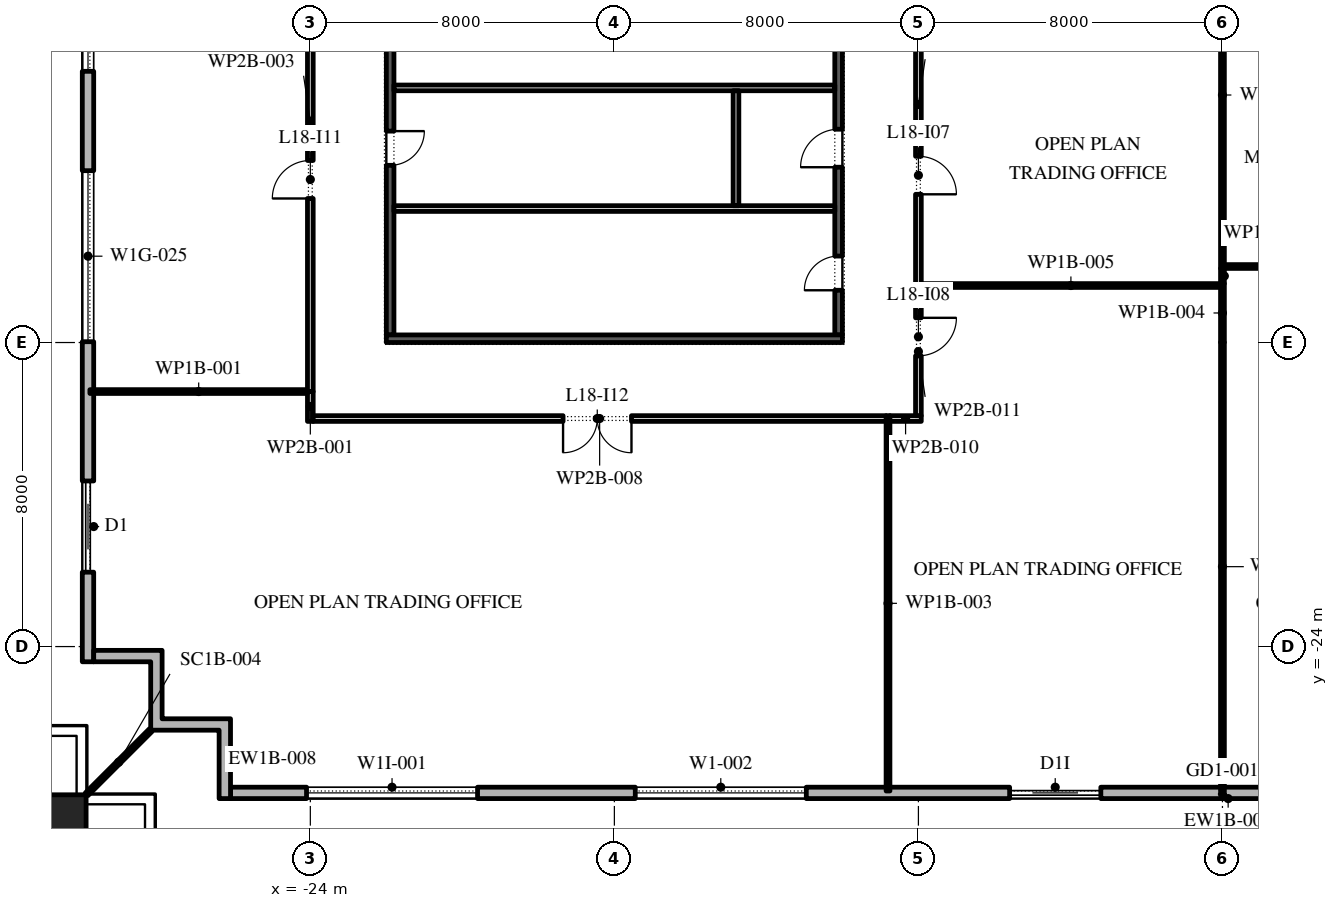
"""IFC4 building model, lengths in metres.
Left out: names, types, materials, properties, quantities, classifications, styles, units other than length and angle.
Written with IfcOpenShell. Run it as: python <this file> out.ifc"""

import sys

from ifc_helpers import new_model, si_unit, direction, frame, frame_2d, origin, origin_2d, place, context, subcontext, project, spatial, polyline, rectangle, outline, extrude, element, fill, save


model = new_model("IFC4")
c1 = context("Model", 3, precision=1e-05, world=origin(), true_north=direction((0.0, 1.0)))
c2 = subcontext(c1, "Body", "Model", "MODEL_VIEW")
j1 = project(units=[si_unit("LENGTHUNIT", "METRE"), si_unit("PLANEANGLEUNIT", "RADIAN")], contexts=[c1])
p1 = place(None, origin())
s1 = spatial("IfcSite", under=j1, at=p1, CompositionType="ELEMENT")
p2 = place(p1, origin())
s2 = spatial("IfcBuilding", under=s1, at=p2, CompositionType="ELEMENT")
p3 = place(p2, frame((0.0, 0.0, 85.8)))
s3 = spatial("IfcBuildingStorey", under=s2, at=p3, CompositionType="ELEMENT", Elevation=85.8)
p4 = place(p3, frame((-30.6, -28.6, 0.0), z_axis=(0.0, 0.0, 1.0), x_axis=(1.0, 0.0, 0.0)))
e1 = element("IfcColumn", 1, at=p4, inside=s3, PredefinedType="COLUMN", context=c2, shape_type="SweptSolid", body=[
    extrude(rectangle(XDim=1.4, YDim=1.4, at=origin_2d()), origin(), (0.0, 0.0, 1.0), 4.2),
])
p5 = place(p3, frame((-26.1, -27.85, 0.0), z_axis=(0.0, 0.0, 1.0), x_axis=(1.0, 0.0, 0.0)))
e2 = element("IfcWall", 2, at=p5, inside=s3, PredefinedType="STANDARD", context=c2, shape_type="SweptSolid", body=[
    extrude(rectangle(XDim=52.5, YDim=0.3, at=frame_2d((26.25, 0.0))), origin(), (0.0, 0.0, 1.0), 3.95),
])
p6 = place(p5, frame((2.0, 0.0, 0.45)))
e3 = element("IfcOpeningElement", 3, at=p6, cuts=e2, PredefinedType="OPENING", context=c2, shape_type="SweptSolid", body=[
    extrude(rectangle(XDim=4.5, YDim=2.7, at=frame_2d((2.25, 1.35))), frame((0.0, 0.16, 0.0), z_axis=(0.0, -1.0, 0.0), x_axis=(1.0, 0.0, 0.0)), (0.0, 0.0, 1.0), 0.32),
])
p7 = place(p5, frame((10.65, 0.0, 0.45)))
e4 = element("IfcOpeningElement", 4, at=p7, cuts=e2, PredefinedType="OPENING", context=c2, shape_type="SweptSolid", body=[
    extrude(rectangle(XDim=4.5, YDim=3.05, at=frame_2d((2.25, 1.525))), frame((0.0, 0.16, 0.0), z_axis=(0.0, -1.0, 0.0), x_axis=(1.0, 0.0, 0.0)), (0.0, 0.0, 1.0), 0.32),
])
p8 = place(p5, frame((20.5, 0.0, 0.0)))
e5 = element("IfcOpeningElement", 5, at=p8, cuts=e2, PredefinedType="OPENING", context=c2, shape_type="SweptSolid", body=[
    extrude(rectangle(XDim=2.4, YDim=3.15, at=frame_2d((1.2, 1.575))), frame((0.0, 0.16, 0.0), z_axis=(0.0, -1.0, 0.0), x_axis=(1.0, 0.0, 0.0)), (0.0, 0.0, 1.0), 0.32),
])
p9 = place(p5, frame((28.25, 0.0, 0.45)))
e6 = element("IfcOpeningElement", 6, at=p9, cuts=e2, PredefinedType="OPENING", context=c2, shape_type="SweptSolid", body=[
    extrude(rectangle(XDim=4.5, YDim=2.7, at=frame_2d((2.25, 1.35))), frame((0.0, 0.16, 0.0), z_axis=(0.0, -1.0, 0.0), x_axis=(1.0, 0.0, 0.0)), (0.0, 0.0, 1.0), 0.32),
])
p10 = place(p5, frame((37.05, 0.0, 0.45)))
e7 = element("IfcOpeningElement", 7, at=p10, cuts=e2, PredefinedType="OPENING", context=c2, shape_type="SweptSolid", body=[
    extrude(rectangle(XDim=4.5, YDim=3.05, at=frame_2d((2.25, 1.525))), frame((0.0, 0.16, 0.0), z_axis=(0.0, -1.0, 0.0), x_axis=(1.0, 0.0, 0.0)), (0.0, 0.0, 1.0), 0.32),
])
p11 = place(p5, frame((45.85, 0.0, 0.45)))
e8 = element("IfcOpeningElement", 8, at=p11, cuts=e2, PredefinedType="OPENING", context=c2, shape_type="SweptSolid", body=[
    extrude(rectangle(XDim=4.5, YDim=2.7, at=frame_2d((2.25, 1.35))), frame((0.0, 0.16, 0.0), z_axis=(0.0, -1.0, 0.0), x_axis=(1.0, 0.0, 0.0)), (0.0, 0.0, 1.0), 0.32),
])
p12 = place(p3, frame((-29.85, 25.1, 0.0), z_axis=(0.0, 0.0, 1.0), x_axis=(0.0, -1.0, 0.0)))
e9 = element("IfcWall", 9, at=p12, inside=s3, PredefinedType="STANDARD", context=c2, shape_type="SweptSolid", body=[
    extrude(rectangle(XDim=49.5, YDim=0.3, at=frame_2d((24.75, 0.0))), origin(), (0.0, 0.0, 1.0), 3.95),
])
p13 = place(p12, frame((1.157, 0.0, 0.45)))
e10 = element("IfcOpeningElement", 10, at=p13, cuts=e9, PredefinedType="OPENING", context=c2, shape_type="SweptSolid", body=[
    extrude(rectangle(XDim=4.5, YDim=2.825, at=frame_2d((2.25, 1.413))), frame((0.0, 0.16, 0.0), z_axis=(0.0, -1.0, 0.0), x_axis=(1.0, 0.0, 0.0)), (0.0, 0.0, 1.0), 0.32),
])
p14 = place(p12, frame((8.121, 0.0, 0.45)))
e11 = element("IfcOpeningElement", 11, at=p14, cuts=e9, PredefinedType="OPENING", context=c2, shape_type="SweptSolid", body=[
    extrude(rectangle(XDim=4.5, YDim=3.05, at=frame_2d((2.25, 1.525))), frame((0.0, 0.16, 0.0), z_axis=(0.0, -1.0, 0.0), x_axis=(1.0, 0.0, 0.0)), (0.0, 0.0, 1.0), 0.32),
])
p15 = place(p12, frame((16.286, 0.0, 0.0)))
e12 = element("IfcOpeningElement", 12, at=p15, cuts=e9, PredefinedType="OPENING", context=c2, shape_type="SweptSolid", body=[
    extrude(rectangle(XDim=2.4, YDim=3.275, at=frame_2d((1.2, 1.637))), frame((0.0, 0.16, 0.0), z_axis=(0.0, -1.0, 0.0), x_axis=(1.0, 0.0, 0.0)), (0.0, 0.0, 1.0), 0.32),
])
p16 = place(p12, frame((22.35, 0.0, 0.45)))
e13 = element("IfcOpeningElement", 13, at=p16, cuts=e9, PredefinedType="OPENING", context=c2, shape_type="SweptSolid", body=[
    extrude(rectangle(XDim=4.5, YDim=2.825, at=frame_2d((2.25, 1.413))), frame((0.0, 0.16, 0.0), z_axis=(0.0, -1.0, 0.0), x_axis=(1.0, 0.0, 0.0)), (0.0, 0.0, 1.0), 0.32),
])
p17 = place(p12, frame((29.464, 0.0, 0.45)))
e14 = element("IfcOpeningElement", 14, at=p17, cuts=e9, PredefinedType="OPENING", context=c2, shape_type="SweptSolid", body=[
    extrude(rectangle(XDim=4.5, YDim=2.825, at=frame_2d((2.25, 1.413))), frame((0.0, 0.16, 0.0), z_axis=(0.0, -1.0, 0.0), x_axis=(1.0, 0.0, 0.0)), (0.0, 0.0, 1.0), 0.32),
])
p18 = place(p12, frame((36.579, 0.0, 0.45)))
e15 = element("IfcOpeningElement", 15, at=p18, cuts=e9, PredefinedType="OPENING", context=c2, shape_type="SweptSolid", body=[
    extrude(rectangle(XDim=4.5, YDim=2.775, at=frame_2d((2.25, 1.387))), frame((0.0, 0.16, 0.0), z_axis=(0.0, -1.0, 0.0), x_axis=(1.0, 0.0, 0.0)), (0.0, 0.0, 1.0), 0.32),
])
p19 = place(p12, frame((44.743, 0.0, 0.0)))
e16 = element("IfcOpeningElement", 16, at=p19, cuts=e9, PredefinedType="OPENING", context=c2, shape_type="SweptSolid", body=[
    extrude(rectangle(XDim=2.4, YDim=3.5, at=frame_2d((1.2, 1.75))), frame((0.0, 0.16, 0.0), z_axis=(0.0, -1.0, 0.0), x_axis=(1.0, 0.0, 0.0)), (0.0, 0.0, 1.0), 0.32),
])
p20 = place(p3, origin())
e17 = element("IfcWall", 17, at=p20, inside=s3, PredefinedType="STANDARD", context=c2, shape_type="SweptSolid", body=[
    extrude(outline(polyline([(-26.4, -26.2), (-28.2, -26.2), (-28.2, -24.4), (-29.7, -24.4), (-29.7, -24.1), (-27.9, -24.1), (-27.9, -25.9), (-26.1, -25.9), (-26.1, -28.0), (-26.4, -28.0), (-26.4, -26.2)])), origin(), (0.0, 0.0, 1.0), 3.95),
])
p21 = place(p3, frame((-28.2, -26.2, -0.05), z_axis=(0.0, 0.0, 1.0), x_axis=(-0.707106781187, -0.707106781187, 0.0)))
e18 = element("IfcWall", 18, at=p21, inside=s3, PredefinedType="STANDARD", context=c2, shape_type="SweptSolid", body=[
    extrude(rectangle(XDim=2.385, YDim=0.1, at=frame_2d((1.192, 0.0))), origin(), (0.0, 0.0, 1.0), 4.0),
])
p22 = place(p3, frame((-21.9, -15.8, 0.0), z_axis=(0.0, 0.0, 1.0), x_axis=(0.0, 1.0, 0.0)))
e19 = element("IfcWall", 19, at=p22, inside=s3, PredefinedType="SHEAR", context=c2, shape_type="SweptSolid", body=[
    extrude(rectangle(XDim=13.05, YDim=0.2, at=frame_2d((6.525, 0.0))), origin(), (0.0, 0.0, 1.0), 3.95),
])
p23 = place(p22, frame((4.462, 0.0, 0.0)))
e20 = element("IfcOpeningElement", 20, at=p23, cuts=e19, PredefinedType="OPENING", context=c2, shape_type="SweptSolid", body=[
    extrude(rectangle(XDim=0.9, YDim=2.1, at=frame_2d((0.45, 1.05))), frame((0.0, 0.11, 0.0), z_axis=(0.0, -1.0, 0.0), x_axis=(1.0, 0.0, 0.0)), (0.0, 0.0, 1.0), 0.22),
])
p24 = place(p3, frame((-10.1, -15.8, 0.0), z_axis=(0.0, 0.0, 1.0), x_axis=(0.0, 1.0, 0.0)))
e21 = element("IfcWall", 21, at=p24, inside=s3, PredefinedType="SHEAR", context=c2, shape_type="SweptSolid", body=[
    extrude(rectangle(XDim=13.05, YDim=0.2, at=frame_2d((6.525, 0.0))), origin(), (0.0, 0.0, 1.0), 3.95),
])
p25 = place(p24, frame((1.175, 0.0, 0.0)))
e22 = element("IfcOpeningElement", 22, at=p25, cuts=e21, PredefinedType="OPENING", context=c2, shape_type="SweptSolid", body=[
    extrude(rectangle(XDim=0.9, YDim=2.1, at=frame_2d((0.45, 1.05))), frame((0.0, 0.11, 0.0), z_axis=(0.0, -1.0, 0.0), x_axis=(1.0, 0.0, 0.0)), (0.0, 0.0, 1.0), 0.22),
])
p26 = place(p24, frame((4.413, 0.0, 0.0)))
e23 = element("IfcOpeningElement", 23, at=p26, cuts=e21, PredefinedType="OPENING", context=c2, shape_type="SweptSolid", body=[
    extrude(rectangle(XDim=1.0, YDim=2.1, at=frame_2d((0.5, 1.05))), frame((0.0, 0.11, 0.0), z_axis=(0.0, -1.0, 0.0), x_axis=(1.0, 0.0, 0.0)), (0.0, 0.0, 1.0), 0.22),
])
p27 = place(p24, frame((9.363, 0.0, 0.0)))
e24 = element("IfcOpeningElement", 24, at=p27, cuts=e21, PredefinedType="OPENING", context=c2, shape_type="SweptSolid", body=[
    extrude(rectangle(XDim=0.9, YDim=2.1, at=frame_2d((0.45, 1.05))), frame((0.0, 0.11, 0.0), z_axis=(0.0, -1.0, 0.0), x_axis=(1.0, 0.0, 0.0)), (0.0, 0.0, 1.0), 0.22),
])
p28 = place(p3, frame((-22.0, -15.9, 0.0), z_axis=(0.0, 0.0, 1.0), x_axis=(1.0, 0.0, 0.0)))
e25 = element("IfcWall", 25, at=p28, inside=s3, PredefinedType="SHEAR", context=c2, shape_type="SweptSolid", body=[
    extrude(rectangle(XDim=12.0, YDim=0.2, at=frame_2d((6.0, 0.0))), origin(), (0.0, 0.0, 1.0), 3.95),
])
for number, where, z_axis, x_axis in (
    (26, (-21.8, -9.3, 0.0), (0.0, 0.0, 1.0), (1.0, 0.0, 0.0)),
    (27, (-21.8, -12.475, 0.0), (0.0, 0.0, 1.0), (1.0, 0.0, 0.0)),
):
    element("IfcWall", number, at=place(p3, frame(where, z_axis=z_axis, x_axis=x_axis)), inside=s3, PredefinedType="PARTITIONING", context=c2, shape_type="SweptSolid", body=[
        extrude(rectangle(XDim=11.6, YDim=0.15, at=frame_2d((5.8, 0.0))), origin(), (0.0, 0.0, 1.0), 3.95),
    ])
p29 = place(p3, frame((-12.8, -12.4, 0.0), z_axis=(0.0, 0.0, 1.0), x_axis=(0.0, 1.0, 0.0)))
e28 = element("IfcWall", 28, at=p29, inside=s3, PredefinedType="PARTITIONING", context=c2, shape_type="SweptSolid", body=[
    extrude(rectangle(XDim=3.025, YDim=0.15, at=frame_2d((1.512, 0.0))), origin(), (0.0, 0.0, 1.0), 3.95),
])
p30 = place(p3, frame((-24.0, -18.075, 0.0), z_axis=(0.0, 0.0, 1.0), x_axis=(0.0, 1.0, 0.0)))
e29 = element("IfcWall", 29, at=p30, inside=s3, PredefinedType="PARTITIONING", context=c2, shape_type="SweptSolid", body=[
    extrude(rectangle(XDim=0.785, YDim=0.15, at=frame_2d((0.393, 0.0))), origin(), (0.0, 0.0, 1.0), 3.95),
])
p31 = place(p3, frame((-24.075, -17.29, 0.0), z_axis=(0.0, 0.0, 1.0), x_axis=(-1.0, 0.0, 0.0)))
e30 = element("IfcWall", 30, at=p31, inside=s3, PredefinedType="PARTITIONING", context=c2, shape_type="SweptSolid", body=[
    extrude(rectangle(XDim=5.725, YDim=0.1, at=frame_2d((2.863, 0.0))), origin(), (0.0, 0.0, 1.0), 3.95),
])
p32 = place(p3, frame((-24.0, -17.29, 0.0), z_axis=(0.0, 0.0, 1.0), x_axis=(0.0, 1.0, 0.0)))
e31 = element("IfcWall", 31, at=p32, inside=s3, PredefinedType="PARTITIONING", context=c2, shape_type="SweptSolid", body=[
    extrude(rectangle(XDim=14.23, YDim=0.15, at=frame_2d((7.115, 0.0))), origin(), (0.0, 0.0, 1.0), 3.95),
])
p33 = place(p32, frame((5.08, 0.0, 0.0)))
e32 = element("IfcOpeningElement", 32, at=p33, cuts=e31, PredefinedType="OPENING", context=c2, shape_type="SweptSolid", body=[
    extrude(rectangle(XDim=1.0, YDim=2.1, at=frame_2d((0.5, 1.05))), frame((0.0, 0.085, 0.0), z_axis=(0.0, -1.0, 0.0), x_axis=(1.0, 0.0, 0.0)), (0.0, 0.0, 1.0), 0.17),
])
p34 = place(p3, frame((-8.8, -27.8, 0.0), z_axis=(0.0, 0.0, 1.0), x_axis=(0.0, 1.0, 0.0)))
e33 = element("IfcWall", 33, at=p34, inside=s3, PredefinedType="PARTITIONING", context=c2, shape_type="SweptSolid", body=[
    extrude(rectangle(XDim=9.875, YDim=0.1, at=frame_2d((4.938, 0.0))), origin(), (0.0, 0.0, 1.0), 3.95),
])
p35 = place(p3, frame((-8.85, -18.0, 0.0), z_axis=(0.0, 0.0, 1.0), x_axis=(-1.0, 0.0, 0.0)))
e34 = element("IfcWall", 34, at=p35, inside=s3, PredefinedType="PARTITIONING", context=c2, shape_type="SweptSolid", body=[
    extrude(rectangle(XDim=15.075, YDim=0.15, at=frame_2d((7.538, 0.0))), origin(), (0.0, 0.0, 1.0), 3.95),
])
p36 = place(p35, frame((6.7, 0.0, 0.0)))
e35 = element("IfcOpeningElement", 35, at=p36, cuts=e34, PredefinedType="OPENING", context=c2, shape_type="SweptSolid", body=[
    extrude(rectangle(XDim=1.8, YDim=2.1, at=frame_2d((0.9, 1.05))), frame((0.0, 0.085, 0.0), z_axis=(0.0, -1.0, 0.0), x_axis=(1.0, 0.0, 0.0)), (0.0, 0.0, 1.0), 0.17),
])
p37 = place(p3, frame((-7.925, -18.0, 0.0), z_axis=(0.0, 0.0, 1.0), x_axis=(-1.0, 0.0, 0.0)))
e36 = element("IfcWall", 36, at=p37, inside=s3, PredefinedType="PARTITIONING", context=c2, shape_type="SweptSolid", body=[
    extrude(rectangle(XDim=0.825, YDim=0.15, at=frame_2d((0.413, 0.0))), origin(), (0.0, 0.0, 1.0), 3.95),
])
p38 = place(p3, frame((-8.0, -14.55, 0.0), z_axis=(0.0, 0.0, 1.0), x_axis=(0.0, -1.0, 0.0)))
e37 = element("IfcWall", 37, at=p38, inside=s3, PredefinedType="PARTITIONING", context=c2, shape_type="SweptSolid", body=[
    extrude(rectangle(XDim=3.375, YDim=0.15, at=frame_2d((1.688, 0.0))), origin(), (0.0, 0.0, 1.0), 3.95),
])
p39 = place(p38, frame((0.8, 0.0, 0.0)))
e38 = element("IfcOpeningElement", 38, at=p39, cuts=e37, PredefinedType="OPENING", context=c2, shape_type="SweptSolid", body=[
    extrude(rectangle(XDim=1.0, YDim=2.1, at=frame_2d((0.5, 1.05))), frame((0.0, 0.085, 0.0), z_axis=(0.0, -1.0, 0.0), x_axis=(1.0, 0.0, 0.0)), (0.0, 0.0, 1.0), 0.17),
])
p40 = place(p3, frame((-8.0, -4.925, 0.0), z_axis=(0.0, 0.0, 1.0), x_axis=(0.0, -1.0, 0.0)))
e39 = element("IfcWall", 39, at=p40, inside=s3, PredefinedType="PARTITIONING", context=c2, shape_type="SweptSolid", body=[
    extrude(rectangle(XDim=9.625, YDim=0.15, at=frame_2d((4.812, 0.0))), origin(), (0.0, 0.0, 1.0), 3.95),
])
p41 = place(p40, frame((6.175, 0.0, 0.0)))
e40 = element("IfcOpeningElement", 40, at=p41, cuts=e39, PredefinedType="OPENING", context=c2, shape_type="SweptSolid", body=[
    extrude(rectangle(XDim=1.0, YDim=2.1, at=frame_2d((0.5, 1.05))), frame((0.0, 0.085, 0.0), z_axis=(0.0, -1.0, 0.0), x_axis=(1.0, 0.0, 0.0)), (0.0, 0.0, 1.0), 0.17),
])
p42 = place(p3, frame((0.0, -27.8, 0.0), z_axis=(0.0, 0.0, 1.0), x_axis=(0.0, 1.0, 0.0)))
e41 = element("IfcWall", 41, at=p42, inside=s3, PredefinedType="PARTITIONING", context=c2, shape_type="SweptSolid", body=[
    extrude(rectangle(XDim=11.805, YDim=0.1, at=frame_2d((5.902, 0.0))), origin(), (0.0, 0.0, 1.0), 3.272),
])
p43 = place(p3, frame((-0.05, -14.5, 0.0), z_axis=(0.0, 0.0, 1.0), x_axis=(-1.0, 0.0, 0.0)))
e42 = element("IfcWall", 42, at=p43, inside=s3, PredefinedType="PARTITIONING", context=c2, shape_type="SweptSolid", body=[
    extrude(rectangle(XDim=7.875, YDim=0.1, at=frame_2d((3.938, 0.0))), origin(), (0.0, 0.0, 1.0), 3.95),
])
p44 = place(p3, frame((0.0, -14.45, 0.0), z_axis=(0.0, 0.0, 1.0), x_axis=(0.0, 1.0, 0.0)))
e43 = element("IfcWall", 43, at=p44, inside=s3, PredefinedType="PARTITIONING", context=c2, shape_type="SweptSolid", body=[
    extrude(rectangle(XDim=0.4, YDim=0.1, at=frame_2d((0.2, 0.0))), origin(), (0.0, 0.0, 1.0), 3.95),
])
p45 = place(p3, frame((0.0, -14.05, 0.0), z_axis=(0.0, 0.0, 1.0), x_axis=(0.0, 1.0, 0.0)))
e44 = element("IfcWall", 44, at=p45, inside=s3, PredefinedType="PARTITIONING", context=c2, shape_type="SweptSolid", body=[
    extrude(rectangle(XDim=9.125, YDim=0.1, at=frame_2d((4.562, 0.0))), origin(), (0.0, 0.0, 1.0), 3.95),
])
p46 = place(p3, frame((0.05, -14.0, 0.0), z_axis=(0.0, 0.0, 1.0), x_axis=(1.0, 0.0, 0.0)))
e45 = element("IfcWall", 45, at=p46, inside=s3, PredefinedType="PARTITIONING", context=c2, shape_type="SweptSolid", body=[
    extrude(rectangle(XDim=8.025, YDim=0.1, at=frame_2d((4.012, 0.0))), origin(), (0.0, 0.0, 1.0), 3.95),
])
p47 = place(p3, frame((0.0, -15.995, 0.0), z_axis=(0.0, 0.0, 1.0), x_axis=(0.0, 1.0, 0.0)))
e46 = element("IfcWall", 46, at=p47, inside=s3, PredefinedType="PARTITIONING", context=c2, shape_type="SweptSolid", body=[
    extrude(rectangle(XDim=1.545, YDim=0.1, at=frame_2d((0.772, 0.0))), origin(), (0.0, 0.0, 1.0), 3.95),
])
p48 = place(p6, origin())
e47 = element("IfcWindow", 47, at=p48, inside=s3, PartitioningType="DOUBLE_PANEL_VERTICAL", PredefinedType="WINDOW", context=c2, shape_type="SweptSolid", body=[
    extrude(rectangle(XDim=4.5, YDim=2.7, at=frame_2d((2.25, 1.35))), frame((0.0, 0.03, 0.0), z_axis=(0.0, -1.0, 0.0), x_axis=(1.0, 0.0, 0.0)), (0.0, 0.0, 1.0), 0.06),
])
fill(e3, e47)
p49 = place(p7, origin())
e48 = element("IfcWindow", 48, at=p49, inside=s3, PartitioningType="DOUBLE_PANEL_VERTICAL", PredefinedType="WINDOW", context=c2, shape_type="SweptSolid", body=[
    extrude(rectangle(XDim=4.5, YDim=3.05, at=frame_2d((2.25, 1.525))), frame((0.0, 0.03, 0.0), z_axis=(0.0, -1.0, 0.0), x_axis=(1.0, 0.0, 0.0)), (0.0, 0.0, 1.0), 0.06),
])
fill(e4, e48)
p50 = place(p8, origin())
e49 = element("IfcDoor", 49, at=p50, inside=s3, OperationType="DOUBLE_DOOR_SLIDING", PredefinedType="DOOR", context=c2, shape_type="SweptSolid", body=[
    extrude(rectangle(XDim=2.4, YDim=3.15, at=frame_2d((1.2, 1.575))), frame((0.0, 0.025, 0.0), z_axis=(0.0, -1.0, 0.0), x_axis=(1.0, 0.0, 0.0)), (0.0, 0.0, 1.0), 0.05),
])
fill(e5, e49)
p51 = place(p17, origin())
e50 = element("IfcWindow", 50, at=p51, inside=s3, PartitioningType="DOUBLE_PANEL_VERTICAL", PredefinedType="WINDOW", context=c2, shape_type="SweptSolid", body=[
    extrude(rectangle(XDim=4.5, YDim=2.825, at=frame_2d((2.25, 1.413))), frame((0.0, 0.03, 0.0), z_axis=(0.0, -1.0, 0.0), x_axis=(1.0, 0.0, 0.0)), (0.0, 0.0, 1.0), 0.06),
])
fill(e14, e50)
p52 = place(p18, origin())
e51 = element("IfcWindow", 51, at=p52, inside=s3, PartitioningType="DOUBLE_PANEL_VERTICAL", PredefinedType="WINDOW", context=c2, shape_type="SweptSolid", body=[
    extrude(rectangle(XDim=4.5, YDim=2.775, at=frame_2d((2.25, 1.387))), frame((0.0, 0.03, 0.0), z_axis=(0.0, -1.0, 0.0), x_axis=(1.0, 0.0, 0.0)), (0.0, 0.0, 1.0), 0.06),
])
fill(e15, e51)
p53 = place(p19, origin())
e52 = element("IfcDoor", 52, at=p53, inside=s3, OperationType="DOUBLE_DOOR_SLIDING", PredefinedType="DOOR", context=c2, shape_type="SweptSolid", body=[
    extrude(rectangle(XDim=2.4, YDim=3.5, at=frame_2d((1.2, 1.75))), frame((0.0, 0.025, 0.0), z_axis=(0.0, -1.0, 0.0), x_axis=(1.0, 0.0, 0.0)), (0.0, 0.0, 1.0), 0.05),
])
fill(e16, e52)
p54 = place(p25, origin())
e53 = element("IfcDoor", 53, at=p54, inside=s3, OperationType="SINGLE_SWING_RIGHT", PredefinedType="DOOR", context=c2, shape_type="SweptSolid", body=[
    extrude(rectangle(XDim=0.9, YDim=2.1, at=frame_2d((0.45, 1.05))), frame((0.0, 0.1, 0.0), z_axis=(0.0, -1.0, 0.0), x_axis=(1.0, 0.0, 0.0)), (0.0, 0.0, 1.0), 0.05),
])
fill(e22, e53)
p55 = place(p26, origin())
e54 = element("IfcDoor", 54, at=p55, inside=s3, OperationType="SINGLE_SWING_RIGHT", PredefinedType="DOOR", context=c2, shape_type="SweptSolid", body=[
    extrude(rectangle(XDim=1.0, YDim=2.1, at=frame_2d((0.5, 1.05))), frame((0.0, 0.1, 0.0), z_axis=(0.0, -1.0, 0.0), x_axis=(1.0, 0.0, 0.0)), (0.0, 0.0, 1.0), 0.05),
])
fill(e23, e54)
p56 = place(p23, frame((0.9, -0.15, 0.0), z_axis=(0.0, 0.0, 1.0), x_axis=(-1.0, 0.0, 0.0)))
e55 = element("IfcDoor", 55, at=p56, inside=s3, OperationType="SINGLE_SWING_RIGHT", PredefinedType="DOOR", context=c2, shape_type="SweptSolid", body=[
    extrude(rectangle(XDim=0.9, YDim=2.1, at=frame_2d((0.45, 1.05))), frame((0.0, -0.05, 0.0), z_axis=(0.0, -1.0, 0.0), x_axis=(1.0, 0.0, 0.0)), (0.0, 0.0, 1.0), 0.05),
])
fill(e20, e55)
p57 = place(p41, origin())
e56 = element("IfcDoor", 56, at=p57, inside=s3, OperationType="SINGLE_SWING_LEFT", PredefinedType="DOOR", context=c2, shape_type="SweptSolid", body=[
    extrude(rectangle(XDim=1.0, YDim=2.1, at=frame_2d((0.5, 1.05))), frame((0.0, 0.025, 0.0), z_axis=(0.0, -1.0, 0.0), x_axis=(1.0, 0.0, 0.0)), (0.0, 0.0, 1.0), 0.05),
])
fill(e40, e56)
p58 = place(p39, origin())
e57 = element("IfcDoor", 57, at=p58, inside=s3, OperationType="SINGLE_SWING_RIGHT", PredefinedType="DOOR", context=c2, shape_type="SweptSolid", body=[
    extrude(rectangle(XDim=1.0, YDim=2.1, at=frame_2d((0.5, 1.05))), frame((0.0, 0.025, 0.0), z_axis=(0.0, -1.0, 0.0), x_axis=(1.0, 0.0, 0.0)), (0.0, 0.0, 1.0), 0.05),
])
fill(e38, e57)
p59 = place(p33, origin())
e58 = element("IfcDoor", 58, at=p59, inside=s3, OperationType="SINGLE_SWING_RIGHT", PredefinedType="DOOR", context=c2, shape_type="SweptSolid", body=[
    extrude(rectangle(XDim=1.0, YDim=2.1, at=frame_2d((0.5, 1.05))), frame((0.0, 0.025, 0.0), z_axis=(0.0, -1.0, 0.0), x_axis=(1.0, 0.0, 0.0)), (0.0, 0.0, 1.0), 0.05),
])
fill(e32, e58)
p60 = place(p36, origin())
e59 = element("IfcDoor", 59, at=p60, inside=s3, OperationType="SINGLE_SWING_RIGHT", PredefinedType="DOOR", context=c2, shape_type="SweptSolid", body=[
    extrude(rectangle(XDim=1.8, YDim=2.1, at=frame_2d((0.9, 1.05))), frame((0.0, 0.025, 0.0), z_axis=(0.0, -1.0, 0.0), x_axis=(1.0, 0.0, 0.0)), (0.0, 0.0, 1.0), 0.05),
])
fill(e35, e59)
save(model, sys.argv[1])
